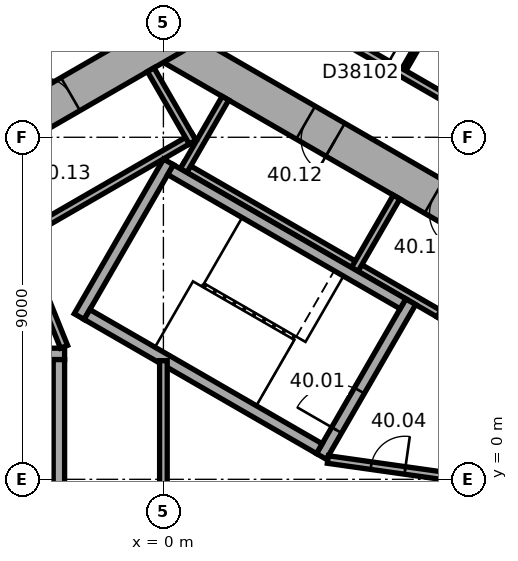
"""IFC4 building model, lengths in metres.
Left out: names, types, materials, properties, quantities, classifications, styles, units other than length and angle.
Written with IfcOpenShell. Run it as: python <this file> out.ifc"""

import sys

from ifc_helpers import new_model, si_unit, direction, frame, frame_2d, origin, place, context, subcontext, project, spatial, rectangle, extrude, element, fill, save


model = new_model("IFC4")
c1 = context("Model", 3, precision=1e-05, world=origin(), true_north=direction((0.0, 1.0)))
c2 = subcontext(c1, "Body", "Model", "MODEL_VIEW")
j1 = project(units=[si_unit("LENGTHUNIT", "METRE"), si_unit("PLANEANGLEUNIT", "RADIAN")], contexts=[c1])
p1 = place(None, origin())
s1 = spatial("IfcSite", under=j1, at=p1, CompositionType="ELEMENT")
p2 = place(p1, origin())
s2 = spatial("IfcBuilding", under=s1, at=p2, CompositionType="ELEMENT")
p3 = place(p2, frame((0.0, 0.0, 165.1)))
s3 = spatial("IfcBuildingStorey", under=s2, at=p3, CompositionType="ELEMENT", Elevation=165.1)
p4 = place(p3, frame((10.25, 5.629, 0.0), z_axis=(0.0, 0.0, 1.0), x_axis=(-0.866022616891, 0.50000482701, 0.0)))
e1 = element("IfcWall", 1, at=p4, inside=s3, PredefinedType="SHEAR", context=c2, shape_type="SweptSolid", body=[
    extrude(rectangle(XDim=12.125, YDim=1.0, at=frame_2d((6.062, 0.0))), origin(), (0.0, 0.0, 1.0), 3.7),
])
p5 = place(p4, frame((2.712, 0.0, 0.0)))
e2 = element("IfcOpeningElement", 2, at=p5, cuts=e1, PredefinedType="OPENING", context=c2, shape_type="SweptSolid", body=[
    extrude(rectangle(XDim=0.9, YDim=2.1, at=frame_2d((0.45, 1.05))), frame((0.0, 0.51, 0.0), z_axis=(0.0, -1.0, 0.0), x_axis=(1.0, 0.0, 0.0)), (0.0, 0.0, 1.0), 1.02),
])
p6 = place(p4, frame((6.612, 0.0, 0.0)))
e3 = element("IfcOpeningElement", 3, at=p6, cuts=e1, PredefinedType="OPENING", context=c2, shape_type="SweptSolid", body=[
    extrude(rectangle(XDim=0.9, YDim=2.1, at=frame_2d((0.45, 1.05))), frame((0.0, 0.51, 0.0), z_axis=(0.0, -1.0, 0.0), x_axis=(1.0, 0.0, 0.0)), (0.0, 0.0, 1.0), 1.02),
])
p7 = place(p3, frame((0.25, 11.691, 0.0), z_axis=(0.0, 0.0, 1.0), x_axis=(-0.866022616891, -0.50000482701, 0.0)))
e4 = element("IfcWall", 4, at=p7, inside=s3, PredefinedType="SHEAR", context=c2, shape_type="SweptSolid", body=[
    extrude(rectangle(XDim=12.125, YDim=1.0, at=frame_2d((6.062, 0.0))), origin(), (0.0, 0.0, 1.0), 3.7),
])
p8 = place(p7, frame((6.262, 0.0, 0.0)))
e5 = element("IfcOpeningElement", 5, at=p8, cuts=e4, PredefinedType="OPENING", context=c2, shape_type="SweptSolid", body=[
    extrude(rectangle(XDim=1.5, YDim=2.1, at=frame_2d((0.75, 1.05))), frame((0.0, 0.51, 0.0), z_axis=(0.0, -1.0, 0.0), x_axis=(1.0, 0.0, 0.0)), (0.0, 0.0, 1.0), 1.02),
])
p9 = place(p7, frame((3.112, 0.0, 0.0)))
e6 = element("IfcOpeningElement", 6, at=p9, cuts=e4, PredefinedType="OPENING", context=c2, shape_type="SweptSolid", body=[
    extrude(rectangle(XDim=0.9, YDim=2.1, at=frame_2d((0.45, 1.05))), frame((0.0, 0.51, 0.0), z_axis=(0.0, -1.0, 0.0), x_axis=(1.0, 0.0, 0.0)), (0.0, 0.0, 1.0), 1.02),
])
p10 = place(p3, frame((7.424, 4.259, 0.0), z_axis=(0.0, 0.0, 1.0), x_axis=(-0.866026010844, 0.49999894854, 0.0)))
e7 = element("IfcWall", 7, at=p10, inside=s3, PredefinedType="PARTITIONING", context=c2, shape_type="SweptSolid", body=[
    extrude(rectangle(XDim=8.0, YDim=0.2, at=frame_2d((4.0, 0.0))), origin(), (0.0, 0.0, 1.0), 3.42),
])
for number, where, z_axis, x_axis in (
    (8, (7.287, 4.222, 0.0), (0.0, 0.0, 1.0), (0.5, 0.866, 0.0)),
    (9, (5.036, 5.522, 0.0), (0.0, 0.0, 1.0), (0.5, 0.866, 0.0)),
    (10, (0.532, 8.122, 0.0), (0.0, 0.0, 1.0), (0.5, 0.866, 0.0)),
):
    element("IfcWall", number, at=place(p3, frame(where, z_axis=z_axis, x_axis=x_axis)), inside=s3, PredefinedType="PARTITIONING", context=c2, shape_type="SweptSolid", body=[
        extrude(rectangle(XDim=2.2, YDim=0.2, at=frame_2d((1.1, 0.0))), origin(), (0.0, 0.0, 1.0), 3.42),
    ])
p11 = place(p3, frame((0.803, 9.009, 0.0), z_axis=(0.0, 0.0, 1.0), x_axis=(-0.866028230842, -0.499995103361, 0.0)))
e11 = element("IfcWall", 11, at=p11, inside=s3, PredefinedType="PARTITIONING", context=c2, shape_type="SweptSolid", body=[
    extrude(rectangle(XDim=5.4, YDim=0.2, at=frame_2d((2.7, 0.0))), origin(), (0.0, 0.0, 1.0), 3.42),
])
p12 = place(p3, frame((0.767, 8.872, 0.0), z_axis=(0.0, 0.0, 1.0), x_axis=(-0.499994660107, 0.866028486751, 0.0)))
e12 = element("IfcWall", 12, at=p12, inside=s3, PredefinedType="PARTITIONING", context=c2, shape_type="SweptSolid", body=[
    extrude(rectangle(XDim=2.2, YDim=0.2, at=frame_2d((1.1, 0.0))), origin(), (0.0, 0.0, 1.0), 3.42),
])
p13 = place(p3, frame((4.158, 0.602, 0.0), z_axis=(0.0, 0.0, 1.0), x_axis=(0.499977259774, 0.866038532462, 0.0)))
e13 = element("IfcWall", 13, at=p13, inside=s3, PredefinedType="SHEAR", context=c2, shape_type="SweptSolid", body=[
    extrude(rectangle(XDim=4.7, YDim=0.3, at=frame_2d((2.35, 0.0))), origin(), (0.0, 0.0, 1.0), 3.42),
])
p14 = place(p13, frame((0.8, 0.0, 0.0)))
e14 = element("IfcOpeningElement", 14, at=p14, cuts=e13, PredefinedType="OPENING", context=c2, shape_type="SweptSolid", body=[
    extrude(rectangle(XDim=1.2, YDim=2.1, at=frame_2d((0.6, 1.05))), frame((0.0, 0.16, 0.0), z_axis=(0.0, -1.0, 0.0), x_axis=(1.0, 0.0, 0.0)), (0.0, 0.0, 1.0), 0.32),
])
p15 = place(p3, frame((-2.216, 4.282, 0.0), z_axis=(0.0, 0.0, 1.0), x_axis=(0.499977259774, 0.866038532462, 0.0)))
e15 = element("IfcWall", 15, at=p15, inside=s3, PredefinedType="SHEAR", context=c2, shape_type="SweptSolid", body=[
    extrude(rectangle(XDim=4.7, YDim=0.3, at=frame_2d((2.35, 0.0))), origin(), (0.0, 0.0, 1.0), 3.42),
])
for number, where, z_axis, x_axis in (
    (16, (4.103, 0.807, 0.0), (0.0, 0.0, 1.0), (-0.866, 0.5, 0.0)),
    (17, (6.303, 4.617, 0.0), (0.0, 0.0, 1.0), (-0.866, 0.5, 0.0)),
):
    element("IfcWall", number, at=place(p3, frame(where, z_axis=z_axis, x_axis=x_axis)), inside=s3, PredefinedType="SHEAR", context=c2, shape_type="SweptSolid", body=[
        extrude(rectangle(XDim=7.06, YDim=0.3, at=frame_2d((3.53, 0.0))), origin(), (0.0, 0.0, 1.0), 3.42),
    ])
p16 = place(p3, frame((-2.6, 3.3, 0.0), z_axis=(0.0, 0.0, 1.0), x_axis=(-1.0, 0.0, 0.0)))
e18 = element("IfcWall", 18, at=p16, inside=s3, PredefinedType="SHEAR", context=c2, shape_type="SweptSolid", body=[
    extrude(rectangle(XDim=4.7, YDim=0.3, at=frame_2d((2.35, 0.0))), origin(), (0.0, 0.0, 1.0), 3.42),
])
p17 = place(p16, frame((0.8, 0.0, 0.0)))
e19 = element("IfcOpeningElement", 19, at=p17, cuts=e18, PredefinedType="OPENING", context=c2, shape_type="SweptSolid", body=[
    extrude(rectangle(XDim=1.2, YDim=2.1, at=frame_2d((0.6, 1.05))), frame((0.0, 0.16, 0.0), z_axis=(0.0, -1.0, 0.0), x_axis=(1.0, 0.0, 0.0)), (0.0, 0.0, 1.0), 0.32),
])
p18 = place(p3, frame((-2.75, 3.15, 0.0), z_axis=(0.0, 0.0, 1.0), x_axis=(0.0, -1.0, 0.0)))
e20 = element("IfcWall", 20, at=p18, inside=s3, PredefinedType="SHEAR", context=c2, shape_type="SweptSolid", body=[
    extrude(rectangle(XDim=7.06, YDim=0.3, at=frame_2d((3.53, 0.0))), origin(), (0.0, 0.0, 1.0), 3.42),
])
p19 = place(p3, frame((4.327, 0.521, 0.0), z_axis=(0.0, 0.0, 1.0), x_axis=(0.990124376366, -0.14019172346, 0.0)))
e21 = element("IfcWall", 21, at=p19, inside=s3, PredefinedType="PARTITIONING", context=c2, shape_type="SweptSolid", body=[
    extrude(rectangle(XDim=3.002, YDim=0.2, at=frame_2d((1.501, 0.0))), origin(), (0.0, 0.0, 1.0), 3.42),
])
p20 = place(p19, frame((1.15, 0.0, 0.0)))
e22 = element("IfcOpeningElement", 22, at=p20, cuts=e21, PredefinedType="OPENING", context=c2, shape_type="SweptSolid", body=[
    extrude(rectangle(XDim=0.9, YDim=2.1, at=frame_2d((0.45, 1.05))), frame((0.0, 0.11, 0.0), z_axis=(0.0, -1.0, 0.0), x_axis=(1.0, 0.0, 0.0)), (0.0, 0.0, 1.0), 0.22),
])
p21 = place(p3, frame((-2.615, 3.487, 0.0), z_axis=(0.0, 0.0, 1.0), x_axis=(-0.373576831041, 0.92759924068, 0.0)))
e23 = element("IfcWall", 23, at=p21, inside=s3, PredefinedType="PARTITIONING", context=c2, shape_type="SweptSolid", body=[
    extrude(rectangle(XDim=3.002, YDim=0.2, at=frame_2d((1.501, 0.0))), origin(), (0.0, 0.0, 1.0), 3.42),
])
p22 = place(p3, frame((0.0, -3.122, 0.0), z_axis=(0.0, 0.0, 1.0), x_axis=(0.0, 1.0, 0.0)))
e24 = element("IfcWall", 24, at=p22, inside=s3, PredefinedType="PARTITIONING", context=c2, shape_type="SweptSolid", body=[
    extrude(rectangle(XDim=6.245, YDim=0.2, at=frame_2d((3.122, 0.0))), origin(), (0.0, 0.0, 1.0), 3.42),
])
p23 = place(p3, frame((-0.95, 13.77, 0.0), z_axis=(0.0, 0.0, 1.0), x_axis=(-0.866036689987, -0.499980451214, 0.0)))
e25 = element("IfcWall", 25, at=p23, inside=s3, PredefinedType="PARTITIONING", context=c2, shape_type="SweptSolid", body=[
    extrude(rectangle(XDim=4.969, YDim=0.2, at=frame_2d((2.485, 0.0))), origin(), (0.0, 0.0, 1.0), 3.42),
])
p24 = place(p3, frame((6.33, 10.779, 0.0), z_axis=(0.0, 0.0, 1.0), x_axis=(0.500010275428, 0.866019471182, 0.0)))
e26 = element("IfcWall", 26, at=p24, inside=s3, PredefinedType="PARTITIONING", context=c2, shape_type="SweptSolid", body=[
    extrude(rectangle(XDim=3.5, YDim=0.12, at=frame_2d((1.75, 0.0))), origin(), (0.0, 0.0, 1.0), 3.42),
])
p25 = place(p24, frame((1.3, 0.0, 0.0)))
e27 = element("IfcOpeningElement", 27, at=p25, cuts=e26, PredefinedType="OPENING", context=c2, shape_type="SweptSolid", body=[
    extrude(rectangle(XDim=0.9, YDim=2.1, at=frame_2d((0.45, 1.05))), frame((0.0, 0.07, 0.0), z_axis=(0.0, -1.0, 0.0), x_axis=(1.0, 0.0, 0.0)), (0.0, 0.0, 1.0), 0.14),
])
p26 = place(p3, frame((9.224, 8.993, 0.0), z_axis=(0.0, 0.0, 1.0), x_axis=(-0.866031754707, 0.499988999718, 0.0)))
e28 = element("IfcWall", 28, at=p26, inside=s3, PredefinedType="PARTITIONING", context=c2, shape_type="SweptSolid", body=[
    extrude(rectangle(XDim=9.514, YDim=0.2, at=frame_2d((4.757, 0.0))), origin(), (0.0, 0.0, 1.0), 3.42),
])
p27 = place(p26, frame((3.848, 0.0, 0.0)))
e29 = element("IfcOpeningElement", 29, at=p27, cuts=e28, PredefinedType="OPENING", context=c2, shape_type="SweptSolid", body=[
    extrude(rectangle(XDim=1.0, YDim=2.1, at=frame_2d((0.5, 1.05))), frame((0.0, 0.11, 0.0), z_axis=(0.0, -1.0, 0.0), x_axis=(1.0, 0.0, 0.0)), (0.0, 0.0, 1.0), 0.22),
])
p28 = place(p14, origin())
e30 = element("IfcDoor", 30, at=p28, inside=s3, OperationType="SINGLE_SWING_RIGHT", PredefinedType="DOOR", context=c2, shape_type="SweptSolid", body=[
    extrude(rectangle(XDim=1.2, YDim=2.1, at=frame_2d((0.6, 1.05))), frame((0.0, 0.025, 0.0), z_axis=(0.0, -1.0, 0.0), x_axis=(1.0, 0.0, 0.0)), (0.0, 0.0, 1.0), 0.05),
])
fill(e14, e30)
p29 = place(p20, origin())
e31 = element("IfcDoor", 31, at=p29, inside=s3, OperationType="SINGLE_SWING_LEFT", PredefinedType="DOOR", context=c2, shape_type="SweptSolid", body=[
    extrude(rectangle(XDim=0.9, YDim=2.1, at=frame_2d((0.45, 1.05))), frame((0.0, 0.025, 0.0), z_axis=(0.0, -1.0, 0.0), x_axis=(1.0, 0.0, 0.0)), (0.0, 0.0, 1.0), 0.05),
])
fill(e22, e31)
p30 = place(p5, origin())
e32 = element("IfcDoor", 32, at=p30, inside=s3, OperationType="SINGLE_SWING_LEFT", PredefinedType="DOOR", context=c2, shape_type="SweptSolid", body=[
    extrude(rectangle(XDim=0.9, YDim=2.1, at=frame_2d((0.45, 1.05))), frame((0.0, 0.025, 0.0), z_axis=(0.0, -1.0, 0.0), x_axis=(1.0, 0.0, 0.0)), (0.0, 0.0, 1.0), 0.05),
])
fill(e2, e32)
p31 = place(p6, origin())
e33 = element("IfcDoor", 33, at=p31, inside=s3, OperationType="SINGLE_SWING_LEFT", PredefinedType="DOOR", context=c2, shape_type="SweptSolid", body=[
    extrude(rectangle(XDim=0.9, YDim=2.1, at=frame_2d((0.45, 1.05))), frame((0.0, 0.025, 0.0), z_axis=(0.0, -1.0, 0.0), x_axis=(1.0, 0.0, 0.0)), (0.0, 0.0, 1.0), 0.05),
])
fill(e3, e33)
p32 = place(p9, origin())
e34 = element("IfcDoor", 34, at=p32, inside=s3, OperationType="SINGLE_SWING_LEFT", PredefinedType="DOOR", context=c2, shape_type="SweptSolid", body=[
    extrude(rectangle(XDim=0.9, YDim=2.1, at=frame_2d((0.45, 1.05))), frame((0.0, 0.025, 0.0), z_axis=(0.0, -1.0, 0.0), x_axis=(1.0, 0.0, 0.0)), (0.0, 0.0, 1.0), 0.05),
])
fill(e6, e34)
p33 = place(p27, origin())
e35 = element("IfcDoor", 35, at=p33, inside=s3, OperationType="SINGLE_SWING_LEFT", PredefinedType="DOOR", context=c2, shape_type="SweptSolid", body=[
    extrude(rectangle(XDim=1.0, YDim=2.1, at=frame_2d((0.5, 1.05))), frame((0.0, 0.025, 0.0), z_axis=(0.0, -1.0, 0.0), x_axis=(1.0, 0.0, 0.0)), (0.0, 0.0, 1.0), 0.05),
])
fill(e29, e35)
save(model, sys.argv[1])
